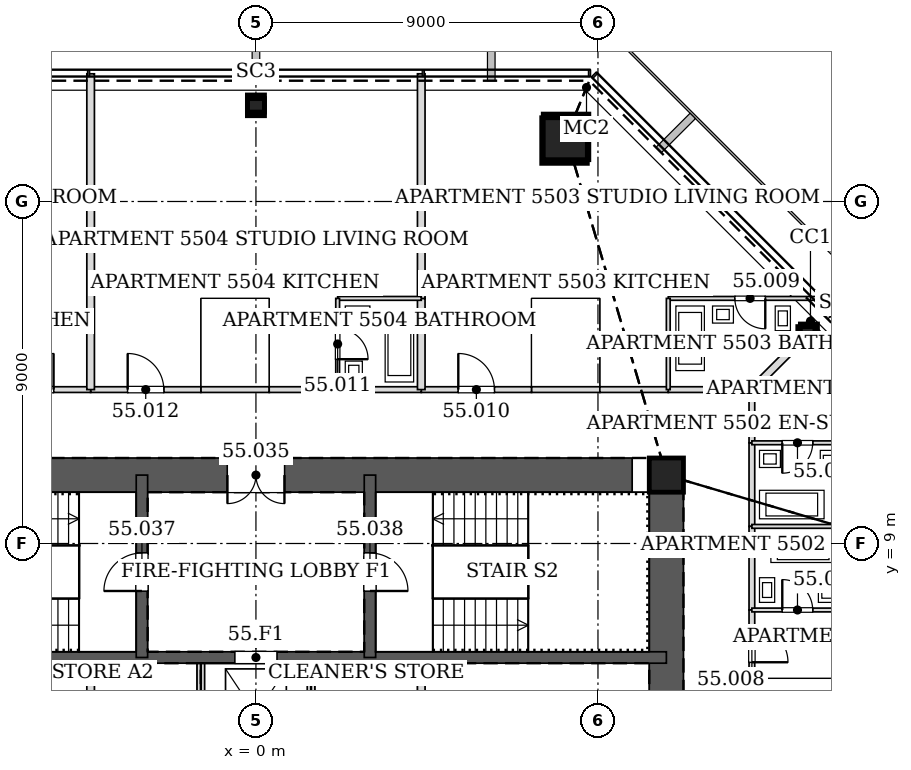
"""IFC4 building model, lengths in metres.
Left out: names, types, materials, properties, quantities, classifications, styles, units other than length and angle.
Written with IfcOpenShell. Run it as: python <this file> out.ifc"""

import sys

from ifc_helpers import new_model, si_unit, direction, frame, frame_2d, origin, origin_2d, place, context, subcontext, project, spatial, rectangle, hollow_rectangle, extrude, element, fill, save


model = new_model("IFC4")
c1 = context("Model", 3, precision=1e-05, world=origin(), true_north=direction((0.0, 1.0)))
c2 = subcontext(c1, "Body", "Model", "MODEL_VIEW")
j1 = project(units=[si_unit("LENGTHUNIT", "METRE"), si_unit("PLANEANGLEUNIT", "RADIAN")], contexts=[c1])
p1 = place(None, origin())
s1 = spatial("IfcSite", under=j1, at=p1, CompositionType="ELEMENT")
p2 = place(p1, origin())
s2 = spatial("IfcBuilding", under=s1, at=p2, CompositionType="ELEMENT")
p3 = place(p2, frame((0.0, 0.0, 234.6)))
s3 = spatial("IfcBuildingStorey", under=s2, at=p3, CompositionType="ELEMENT", Elevation=234.6)
p4 = place(p3, frame((8.16, 19.7, 0.0), z_axis=(-0.01169924247, -0.02827915051, 0.999531598986), x_axis=(0.924045401938, -0.382282742426, 0.0)))
e1 = element("IfcColumn", 1, at=p4, inside=s3, PredefinedType="COLUMN", context=c2, shape_type="SweptSolid", body=[
    extrude(hollow_rectangle(XDim=1.2, YDim=1.2, WallThickness=0.055, at=origin_2d()), origin(), (0.0, 0.0, 1.0), 3.402),
])
for number, where, z_axis, x_axis in (
    (2, (14.551, 14.551, 0.0), (-0.02, -0.02, 1.0), (0.707, -0.707, 0.0)),
    (3, (0.0, 20.578, 0.0), (0.0, -0.028, 1.0), (1.0, 0.0, 0.0)),
):
    element("IfcColumn", number, at=place(p3, frame(where, z_axis=z_axis, x_axis=x_axis)), inside=s3, PredefinedType="COLUMN", context=c2, shape_type="SweptSolid", body=[
        extrude(hollow_rectangle(XDim=0.45, YDim=0.45, WallThickness=0.02, at=origin_2d()), origin(), (0.0, 0.0, 1.0), 3.401),
    ])
p5 = place(p3, frame((10.8, 10.8, 0.0), z_axis=(0.0, 0.0, 1.0), x_axis=(1.0, 0.0, 0.0)))
e4 = element("IfcColumn", 4, at=p5, inside=s3, PredefinedType="COLUMN", context=c2, shape_type="SweptSolid", body=[
    extrude(hollow_rectangle(XDim=0.9, YDim=0.9, WallThickness=0.04, at=origin_2d()), origin(), (0.0, 0.0, 1.0), 3.4),
])
p6 = place(p3, frame((10.8, -10.8, 0.0), z_axis=(0.0, 0.0, 1.0), x_axis=(0.0, 1.0, 0.0)))
e5 = element("IfcWall", 5, at=p6, inside=s3, PredefinedType="SOLIDWALL", context=c2, shape_type="SweptSolid", body=[
    extrude(rectangle(XDim=21.6, YDim=0.9, at=frame_2d((10.8, 0.0))), origin(), (0.0, 0.0, 1.0), 3.4),
])
p7 = place(p6, frame((11.7, 0.0, 0.0)))
e6 = element("IfcOpeningElement", 6, at=p7, cuts=e5, PredefinedType="OPENING", context=c2, shape_type="SweptSolid", body=[
    extrude(rectangle(XDim=1.2, YDim=2.1, at=frame_2d((0.6, 1.05))), frame((0.0, 0.46, 0.0), z_axis=(0.0, -1.0, 0.0), x_axis=(1.0, 0.0, 0.0)), (0.0, 0.0, 1.0), 0.92),
])
p8 = place(p6, frame((8.7, 0.0, 0.0)))
e7 = element("IfcOpeningElement", 7, at=p8, cuts=e5, PredefinedType="OPENING", context=c2, shape_type="SweptSolid", body=[
    extrude(rectangle(XDim=1.2, YDim=2.1, at=frame_2d((0.6, 1.05))), frame((0.0, 0.46, 0.0), z_axis=(0.0, -1.0, 0.0), x_axis=(1.0, 0.0, 0.0)), (0.0, 0.0, 1.0), 0.92),
])
p9 = place(p3, frame((10.8, 10.8, 0.0), z_axis=(0.0, 0.0, 1.0), x_axis=(-1.0, 0.0, 0.0)))
e8 = element("IfcWall", 8, at=p9, inside=s3, PredefinedType="SOLIDWALL", context=c2, shape_type="SweptSolid", body=[
    extrude(rectangle(XDim=21.6, YDim=0.9, at=frame_2d((10.8, 0.0))), origin(), (0.0, 0.0, 1.0), 3.4),
])
p10 = place(p9, frame((10.05, 0.0, 0.0)))
e9 = element("IfcOpeningElement", 9, at=p10, cuts=e8, PredefinedType="OPENING", context=c2, shape_type="SweptSolid", body=[
    extrude(rectangle(XDim=1.5, YDim=2.1, at=frame_2d((0.75, 1.05))), frame((0.0, 0.46, 0.0), z_axis=(0.0, -1.0, 0.0), x_axis=(1.0, 0.0, 0.0)), (0.0, 0.0, 1.0), 0.92),
])
p11 = place(p3, frame((-10.8, 6.0, 0.0), z_axis=(0.0, 0.0, 1.0), x_axis=(1.0, 0.0, 0.0)))
e10 = element("IfcWall", 10, at=p11, inside=s3, PredefinedType="SOLIDWALL", context=c2, shape_type="SweptSolid", body=[
    extrude(rectangle(XDim=21.6, YDim=0.3, at=frame_2d((10.8, 0.0))), origin(), (0.0, 0.0, 1.0), 3.4),
])
p12 = place(p11, frame((10.25, 0.0, 0.0)))
e11 = element("IfcOpeningElement", 11, at=p12, cuts=e10, PredefinedType="OPENING", context=c2, shape_type="SweptSolid", body=[
    extrude(rectangle(XDim=1.1, YDim=2.1, at=frame_2d((0.55, 1.05))), frame((0.0, 0.16, 0.0), z_axis=(0.0, -1.0, 0.0), x_axis=(1.0, 0.0, 0.0)), (0.0, 0.0, 1.0), 0.32),
])
p13 = place(p3, frame((-3.0, 6.0, 0.0), z_axis=(0.0, 0.0, 1.0), x_axis=(0.0, 1.0, 0.0)))
e12 = element("IfcWall", 12, at=p13, inside=s3, PredefinedType="SOLIDWALL", context=c2, shape_type="SweptSolid", body=[
    extrude(rectangle(XDim=4.8, YDim=0.3, at=frame_2d((2.4, 0.0))), origin(), (0.0, 0.0, 1.0), 3.4),
])
p14 = place(p13, frame((1.75, 0.0, 0.0)))
e13 = element("IfcOpeningElement", 13, at=p14, cuts=e12, PredefinedType="OPENING", context=c2, shape_type="SweptSolid", body=[
    extrude(rectangle(XDim=1.0, YDim=2.1, at=frame_2d((0.5, 1.05))), frame((0.0, 0.16, 0.0), z_axis=(0.0, -1.0, 0.0), x_axis=(1.0, 0.0, 0.0)), (0.0, 0.0, 1.0), 0.32),
])
p15 = place(p3, frame((3.0, 6.0, 0.0), z_axis=(0.0, 0.0, 1.0), x_axis=(0.0, 1.0, 0.0)))
e14 = element("IfcWall", 14, at=p15, inside=s3, PredefinedType="SOLIDWALL", context=c2, shape_type="SweptSolid", body=[
    extrude(rectangle(XDim=4.8, YDim=0.3, at=frame_2d((2.4, 0.0))), origin(), (0.0, 0.0, 1.0), 3.4),
])
p16 = place(p15, frame((1.75, 0.0, 0.0)))
e15 = element("IfcOpeningElement", 15, at=p16, cuts=e14, PredefinedType="OPENING", context=c2, shape_type="SweptSolid", body=[
    extrude(rectangle(XDim=1.0, YDim=2.1, at=frame_2d((0.5, 1.05))), frame((0.0, 0.16, 0.0), z_axis=(0.0, -1.0, 0.0), x_axis=(1.0, 0.0, 0.0)), (0.0, 0.0, 1.0), 0.32),
])
p17 = place(p3, frame((13.05, 9.449, 0.0), z_axis=(0.0, 0.0, 1.0), x_axis=(0.0, 1.0, 0.0)))
e16 = element("IfcWall", 16, at=p17, inside=s3, PredefinedType="PARTITIONING", context=c2, shape_type="SweptSolid", body=[
    extrude(rectangle(XDim=2.202, YDim=0.15, at=frame_2d((1.101, 0.0))), origin(), (0.0, 0.0, 1.0), 2.344),
])
p18 = place(p3, frame((13.05, 11.649, 0.0), z_axis=(0.0, 0.0, 1.0), x_axis=(0.0, 1.0, 0.0)))
e17 = element("IfcWall", 17, at=p18, inside=s3, PredefinedType="PARTITIONING", context=c2, shape_type="SweptSolid", body=[
    extrude(rectangle(XDim=1.401, YDim=0.15, at=frame_2d((0.701, 0.0))), origin(), (0.0, 0.0, 1.0), 2.583),
])
p19 = place(p3, frame((13.05, 7.249, 0.0), z_axis=(0.0, 0.0, 1.0), x_axis=(0.0, 1.0, 0.0)))
e18 = element("IfcWall", 18, at=p19, inside=s3, PredefinedType="PARTITIONING", context=c2, shape_type="SweptSolid", body=[
    extrude(rectangle(XDim=2.202, YDim=0.15, at=frame_2d((1.101, 0.0))), origin(), (0.0, 0.0, 1.0), 2.73),
])
p20 = place(p3, frame((13.05, 3.649, 0.0), z_axis=(0.0, 0.0, 1.0), x_axis=(0.0, 1.0, 0.0)))
e19 = element("IfcWall", 19, at=p20, inside=s3, PredefinedType="PARTITIONING", context=c2, shape_type="SweptSolid", body=[
    extrude(rectangle(XDim=1.802, YDim=0.15, at=frame_2d((0.901, 0.0))), origin(), (0.0, 0.0, 1.0), 2.73),
])
p21 = place(p3, frame((13.05, 5.449, 0.0), z_axis=(0.0, 0.0, 1.0), x_axis=(0.0, 1.0, 0.0)))
e20 = element("IfcWall", 20, at=p21, inside=s3, PredefinedType="PARTITIONING", context=c2, shape_type="SweptSolid", body=[
    extrude(rectangle(XDim=1.802, YDim=0.15, at=frame_2d((0.901, 0.0))), origin(), (0.0, 0.0, 1.0), 2.73),
])
p22 = place(p21, frame((0.426, 0.0, 0.0)))
e21 = element("IfcOpeningElement", 21, at=p22, cuts=e20, PredefinedType="OPENING", context=c2, shape_type="SweptSolid", body=[
    extrude(rectangle(XDim=0.95, YDim=2.1, at=frame_2d((0.475, 1.05))), frame((0.0, 0.085, 0.0), z_axis=(0.0, -1.0, 0.0), x_axis=(1.0, 0.0, 0.0)), (0.0, 0.0, 1.0), 0.17),
])
p23 = place(p3, frame((13.05, 13.05, 0.0), z_axis=(0.0, 0.0, 1.0), x_axis=(-1.0, 0.0, 0.0)))
e22 = element("IfcWall", 22, at=p23, inside=s3, PredefinedType="PARTITIONING", context=c2, shape_type="SweptSolid", body=[
    extrude(rectangle(XDim=2.201, YDim=0.15, at=frame_2d((1.101, 0.0))), origin(), (0.0, 0.0, 1.0), 2.583),
])
p24 = place(p3, frame((9.051, 13.05, 0.0), z_axis=(0.0, 0.0, 1.0), x_axis=(-1.0, 0.0, 0.0)))
e23 = element("IfcWall", 23, at=p24, inside=s3, PredefinedType="PARTITIONING", context=c2, shape_type="SweptSolid", body=[
    extrude(rectangle(XDim=1.802, YDim=0.15, at=frame_2d((0.901, 0.0))), origin(), (0.0, 0.0, 1.0), 2.73),
])
p25 = place(p3, frame((7.251, 13.05, 0.0), z_axis=(0.0, 0.0, 1.0), x_axis=(-1.0, 0.0, 0.0)))
e24 = element("IfcWall", 24, at=p25, inside=s3, PredefinedType="PARTITIONING", context=c2, shape_type="SweptSolid", body=[
    extrude(rectangle(XDim=2.902, YDim=0.15, at=frame_2d((1.451, 0.0))), origin(), (0.0, 0.0, 1.0), 2.73),
])
p26 = place(p25, frame((0.976, 0.0, 0.0)))
e25 = element("IfcOpeningElement", 25, at=p26, cuts=e24, PredefinedType="OPENING", context=c2, shape_type="SweptSolid", body=[
    extrude(rectangle(XDim=0.95, YDim=2.1, at=frame_2d((0.475, 1.05))), frame((0.0, 0.085, 0.0), z_axis=(0.0, -1.0, 0.0), x_axis=(1.0, 0.0, 0.0)), (0.0, 0.0, 1.0), 0.17),
])
p27 = place(p3, frame((10.851, 13.05, 0.0), z_axis=(0.0, 0.0, 1.0), x_axis=(-1.0, 0.0, 0.0)))
e26 = element("IfcWall", 26, at=p27, inside=s3, PredefinedType="PARTITIONING", context=c2, shape_type="SweptSolid", body=[
    extrude(rectangle(XDim=1.802, YDim=0.15, at=frame_2d((0.901, 0.0))), origin(), (0.0, 0.0, 1.0), 2.344),
])
p28 = place(p3, frame((4.351, 13.05, 0.0), z_axis=(0.0, 0.0, 1.0), x_axis=(-1.0, 0.0, 0.0)))
e27 = element("IfcWall", 27, at=p28, inside=s3, PredefinedType="PARTITIONING", context=c2, shape_type="SweptSolid", body=[
    extrude(rectangle(XDim=2.202, YDim=0.15, at=frame_2d((1.101, 0.0))), origin(), (0.0, 0.0, 1.0), 2.73),
])
p29 = place(p3, frame((0.351, 13.05, 0.0), z_axis=(0.0, 0.0, 1.0), x_axis=(-1.0, 0.0, 0.0)))
e28 = element("IfcWall", 28, at=p29, inside=s3, PredefinedType="PARTITIONING", context=c2, shape_type="SweptSolid", body=[
    extrude(rectangle(XDim=1.802, YDim=0.15, at=frame_2d((0.901, 0.0))), origin(), (0.0, 0.0, 1.0), 2.331),
])
p30 = place(p3, frame((-1.449, 13.05, 0.0), z_axis=(0.0, 0.0, 1.0), x_axis=(-1.0, 0.0, 0.0)))
e29 = element("IfcWall", 29, at=p30, inside=s3, PredefinedType="PARTITIONING", context=c2, shape_type="SweptSolid", body=[
    extrude(rectangle(XDim=2.902, YDim=0.15, at=frame_2d((1.451, 0.0))), origin(), (0.0, 0.0, 1.0), 2.73),
])
p31 = place(p30, frame((0.976, 0.0, 0.0)))
e30 = element("IfcOpeningElement", 30, at=p31, cuts=e29, PredefinedType="OPENING", context=c2, shape_type="SweptSolid", body=[
    extrude(rectangle(XDim=0.95, YDim=2.1, at=frame_2d((0.475, 1.05))), frame((0.0, 0.085, 0.0), z_axis=(0.0, -1.0, 0.0), x_axis=(1.0, 0.0, 0.0)), (0.0, 0.0, 1.0), 0.17),
])
p32 = place(p3, frame((2.151, 13.05, 0.0), z_axis=(0.0, 0.0, 1.0), x_axis=(-1.0, 0.0, 0.0)))
e31 = element("IfcWall", 31, at=p32, inside=s3, PredefinedType="PARTITIONING", context=c2, shape_type="SweptSolid", body=[
    extrude(rectangle(XDim=1.802, YDim=0.15, at=frame_2d((0.901, 0.0))), origin(), (0.0, 0.0, 1.0), 2.73),
])
p33 = place(p3, frame((-4.349, 13.05, 0.0), z_axis=(0.0, 0.0, 1.0), x_axis=(-1.0, 0.0, 0.0)))
e32 = element("IfcWall", 32, at=p33, inside=s3, PredefinedType="PARTITIONING", context=c2, shape_type="SweptSolid", body=[
    extrude(rectangle(XDim=2.902, YDim=0.15, at=frame_2d((1.451, 0.0))), origin(), (0.0, 0.0, 1.0), 2.73),
])
p34 = place(p33, frame((0.976, 0.0, 0.0)))
e33 = element("IfcOpeningElement", 33, at=p34, cuts=e32, PredefinedType="OPENING", context=c2, shape_type="SweptSolid", body=[
    extrude(rectangle(XDim=0.95, YDim=2.1, at=frame_2d((0.475, 1.05))), frame((0.0, 0.085, 0.0), z_axis=(0.0, -1.0, 0.0), x_axis=(1.0, 0.0, 0.0)), (0.0, 0.0, 1.0), 0.17),
])
p35 = place(p3, frame((15.45, 11.65, 0.0), z_axis=(0.0, 0.0, 1.0), x_axis=(-1.0, 0.0, 0.0)))
e34 = element("IfcWall", 34, at=p35, inside=s3, PredefinedType="PARTITIONING", context=c2, shape_type="SweptSolid", body=[
    extrude(rectangle(XDim=2.4, YDim=0.1, at=frame_2d((1.2, 0.0))), origin(), (0.0, 0.0, 1.0), 2.786),
])
p36 = place(p35, frame((0.8, 0.0, 0.0)))
e35 = element("IfcOpeningElement", 35, at=p36, cuts=e34, PredefinedType="OPENING", context=c2, shape_type="SweptSolid", body=[
    extrude(rectangle(XDim=0.8, YDim=2.1, at=frame_2d((0.4, 1.05))), frame((0.0, 0.06, 0.0), z_axis=(0.0, -1.0, 0.0), x_axis=(1.0, 0.0, 0.0)), (0.0, 0.0, 1.0), 0.12),
])
p37 = place(p3, frame((13.05, 9.45, 0.0), z_axis=(0.0, 0.0, 1.0), x_axis=(1.0, 0.0, 0.0)))
e36 = element("IfcWall", 36, at=p37, inside=s3, PredefinedType="PARTITIONING", context=c2, shape_type="SweptSolid", body=[
    extrude(rectangle(XDim=2.4, YDim=0.1, at=frame_2d((1.2, 0.0))), origin(), (0.0, 0.0, 1.0), 2.344),
])
p38 = place(p3, frame((14.31, 14.31, 0.0), z_axis=(0.0, 0.0, 1.0), x_axis=(-0.707106781187, -0.707106781187, 0.0)))
e37 = element("IfcWall", 37, at=p38, inside=s3, PredefinedType="PARTITIONING", context=c2, shape_type="SweptSolid", body=[
    extrude(rectangle(XDim=1.782, YDim=0.2, at=frame_2d((0.891, 0.0))), origin(), (0.0, 0.0, 1.0), 2.583),
])
p39 = place(p3, frame((13.05, 7.25, 0.0), z_axis=(0.0, 0.0, 1.0), x_axis=(1.0, 0.0, 0.0)))
e38 = element("IfcWall", 38, at=p39, inside=s3, PredefinedType="PARTITIONING", context=c2, shape_type="SweptSolid", body=[
    extrude(rectangle(XDim=2.4, YDim=0.1, at=frame_2d((1.2, 0.0))), origin(), (0.0, 0.0, 1.0), 2.73),
])
p40 = place(p39, frame((0.8, 0.0, 0.0)))
e39 = element("IfcOpeningElement", 39, at=p40, cuts=e38, PredefinedType="OPENING", context=c2, shape_type="SweptSolid", body=[
    extrude(rectangle(XDim=0.8, YDim=2.1, at=frame_2d((0.4, 1.05))), frame((0.0, 0.06, 0.0), z_axis=(0.0, -1.0, 0.0), x_axis=(1.0, 0.0, 0.0)), (0.0, 0.0, 1.0), 0.12),
])
p41 = place(p3, frame((14.762, 15.45, 0.0), z_axis=(0.0, 0.0, 1.0), x_axis=(-1.0, 0.0, 0.0)))
e40 = element("IfcWall", 40, at=p41, inside=s3, PredefinedType="PARTITIONING", context=c2, shape_type="SweptSolid", body=[
    extrude(rectangle(XDim=3.912, YDim=0.1, at=frame_2d((1.956, 0.0))), origin(), (0.0, 0.0, 1.0), 2.783),
])
p42 = place(p41, frame((1.359, 0.0, 0.0)))
e41 = element("IfcOpeningElement", 41, at=p42, cuts=e40, PredefinedType="OPENING", context=c2, shape_type="SweptSolid", body=[
    extrude(rectangle(XDim=0.8, YDim=2.1, at=frame_2d((0.4, 1.05))), frame((0.0, 0.06, 0.0), z_axis=(0.0, -1.0, 0.0), x_axis=(1.0, 0.0, 0.0)), (0.0, 0.0, 1.0), 0.12),
])
p43 = place(p3, frame((10.85, 15.45, 0.0), z_axis=(0.0, 0.0, 1.0), x_axis=(0.0, -1.0, 0.0)))
e42 = element("IfcWall", 42, at=p43, inside=s3, PredefinedType="PARTITIONING", context=c2, shape_type="SweptSolid", body=[
    extrude(rectangle(XDim=2.4, YDim=0.1, at=frame_2d((1.2, 0.0))), origin(), (0.0, 0.0, 1.0), 2.786),
])
p44 = place(p3, frame((4.35, 15.451, 0.0), z_axis=(0.0, 0.0, 1.0), x_axis=(0.0, -1.0, 0.0)))
e43 = element("IfcWall", 43, at=p44, inside=s3, PredefinedType="PARTITIONING", context=c2, shape_type="SweptSolid", body=[
    extrude(rectangle(XDim=2.401, YDim=0.2, at=frame_2d((1.2, 0.0))), origin(), (0.0, 0.0, 1.0), 2.73),
])
p45 = place(p3, frame((4.35, 21.36, 0.0), z_axis=(0.0, 0.0, 1.0), x_axis=(0.0, -1.0, 0.0)))
e44 = element("IfcWall", 44, at=p45, inside=s3, PredefinedType="PARTITIONING", context=c2, shape_type="SweptSolid", body=[
    extrude(rectangle(XDim=5.911, YDim=0.2, at=frame_2d((2.956, 0.0))), origin(), (0.0, 0.0, 1.0), 2.662),
])
p46 = place(p3, frame((4.35, 15.45, 0.0), z_axis=(0.0, 0.0, 1.0), x_axis=(-1.0, 0.0, 0.0)))
e45 = element("IfcWall", 45, at=p46, inside=s3, PredefinedType="PARTITIONING", context=c2, shape_type="SweptSolid", body=[
    extrude(rectangle(XDim=2.2, YDim=0.1, at=frame_2d((1.1, 0.0))), origin(), (0.0, 0.0, 1.0), 3.2),
])
p47 = place(p3, frame((2.15, 15.45, 0.0), z_axis=(0.0, 0.0, 1.0), x_axis=(0.0, -1.0, 0.0)))
e46 = element("IfcWall", 46, at=p47, inside=s3, PredefinedType="PARTITIONING", context=c2, shape_type="SweptSolid", body=[
    extrude(rectangle(XDim=2.4, YDim=0.1, at=frame_2d((1.2, 0.0))), origin(), (0.0, 0.0, 1.0), 2.73),
])
p48 = place(p47, frame((0.8, 0.0, 0.0)))
e47 = element("IfcOpeningElement", 47, at=p48, cuts=e46, PredefinedType="OPENING", context=c2, shape_type="SweptSolid", body=[
    extrude(rectangle(XDim=0.8, YDim=2.1, at=frame_2d((0.4, 1.05))), frame((0.0, 0.06, 0.0), z_axis=(0.0, -1.0, 0.0), x_axis=(1.0, 0.0, 0.0)), (0.0, 0.0, 1.0), 0.12),
])
p49 = place(p3, frame((-4.35, 21.36, 0.0), z_axis=(0.0, 0.0, 1.0), x_axis=(0.0, -1.0, 0.0)))
e48 = element("IfcWall", 48, at=p49, inside=s3, PredefinedType="PARTITIONING", context=c2, shape_type="SweptSolid", body=[
    extrude(rectangle(XDim=8.31, YDim=0.2, at=frame_2d((4.155, 0.0))), origin(), (0.0, 0.0, 1.0), 2.662),
])
for number, where, z_axis, x_axis in (
    (49, (-4.35, 3.15, 0.0), (0.0, 0.0, 1.0), (0.0, 1.0, 0.0)),
    (50, (-1.45, 3.15, 0.0), (0.0, 0.0, 1.0), (0.0, 1.0, 0.0)),
    (51, (1.45, 3.15, 0.0), (0.0, 0.0, 1.0), (0.0, 1.0, 0.0)),
    (52, (4.35, 3.15, 0.0), (0.0, 0.0, 1.0), (0.0, 1.0, 0.0)),
):
    element("IfcWall", number, at=place(p3, frame(where, z_axis=z_axis, x_axis=x_axis)), inside=s3, PredefinedType="PARTITIONING", context=c2, shape_type="SweptSolid", body=[
        extrude(rectangle(XDim=2.7, YDim=0.2, at=frame_2d((1.35, 0.0))), origin(), (0.0, 0.0, 1.0), 3.2),
    ])
p50 = place(p36, origin())
e53 = element("IfcDoor", 53, at=p50, inside=s3, OperationType="SINGLE_SWING_RIGHT", PredefinedType="DOOR", context=c2, shape_type="SweptSolid", body=[
    extrude(rectangle(XDim=0.8, YDim=2.1, at=frame_2d((0.4, 1.05))), frame((0.0, 0.025, 0.0), z_axis=(0.0, -1.0, 0.0), x_axis=(1.0, 0.0, 0.0)), (0.0, 0.0, 1.0), 0.05),
])
fill(e35, e53)
p51 = place(p40, origin())
e54 = element("IfcDoor", 54, at=p51, inside=s3, OperationType="SINGLE_SWING_LEFT", PredefinedType="DOOR", context=c2, shape_type="SweptSolid", body=[
    extrude(rectangle(XDim=0.8, YDim=2.1, at=frame_2d((0.4, 1.05))), frame((0.0, 0.025, 0.0), z_axis=(0.0, -1.0, 0.0), x_axis=(1.0, 0.0, 0.0)), (0.0, 0.0, 1.0), 0.05),
])
fill(e39, e54)
p52 = place(p22, frame((0.95, 0.0, 0.0), z_axis=(0.0, 0.0, 1.0), x_axis=(-1.0, 0.0, 0.0)))
e55 = element("IfcDoor", 55, at=p52, inside=s3, OperationType="SINGLE_SWING_RIGHT", PredefinedType="DOOR", context=c2, shape_type="SweptSolid", body=[
    extrude(rectangle(XDim=0.95, YDim=2.1, at=frame_2d((0.475, 1.05))), frame((0.0, 0.025, 0.0), z_axis=(0.0, -1.0, 0.0), x_axis=(1.0, 0.0, 0.0)), (0.0, 0.0, 1.0), 0.05),
])
fill(e21, e55)
p53 = place(p42, origin())
e56 = element("IfcDoor", 56, at=p53, inside=s3, OperationType="SINGLE_SWING_LEFT", PredefinedType="DOOR", context=c2, shape_type="SweptSolid", body=[
    extrude(rectangle(XDim=0.8, YDim=2.1, at=frame_2d((0.4, 1.05))), frame((0.0, 0.025, 0.0), z_axis=(0.0, -1.0, 0.0), x_axis=(1.0, 0.0, 0.0)), (0.0, 0.0, 1.0), 0.05),
])
fill(e41, e56)
p54 = place(p26, frame((0.95, 0.0, 0.0), z_axis=(0.0, 0.0, 1.0), x_axis=(-1.0, 0.0, 0.0)))
e57 = element("IfcDoor", 57, at=p54, inside=s3, OperationType="SINGLE_SWING_LEFT", PredefinedType="DOOR", context=c2, shape_type="SweptSolid", body=[
    extrude(rectangle(XDim=0.95, YDim=2.1, at=frame_2d((0.475, 1.05))), frame((0.0, 0.025, 0.0), z_axis=(0.0, -1.0, 0.0), x_axis=(1.0, 0.0, 0.0)), (0.0, 0.0, 1.0), 0.05),
])
fill(e25, e57)
p55 = place(p48, origin())
e58 = element("IfcDoor", 58, at=p55, inside=s3, OperationType="SINGLE_SWING_RIGHT", PredefinedType="DOOR", context=c2, shape_type="SweptSolid", body=[
    extrude(rectangle(XDim=0.8, YDim=2.1, at=frame_2d((0.4, 1.05))), frame((0.0, 0.025, 0.0), z_axis=(0.0, -1.0, 0.0), x_axis=(1.0, 0.0, 0.0)), (0.0, 0.0, 1.0), 0.05),
])
fill(e47, e58)
p56 = place(p31, frame((0.95, 0.0, 0.0), z_axis=(0.0, 0.0, 1.0), x_axis=(-1.0, 0.0, 0.0)))
e59 = element("IfcDoor", 59, at=p56, inside=s3, OperationType="SINGLE_SWING_LEFT", PredefinedType="DOOR", context=c2, shape_type="SweptSolid", body=[
    extrude(rectangle(XDim=0.95, YDim=2.1, at=frame_2d((0.475, 1.05))), frame((0.0, 0.025, 0.0), z_axis=(0.0, -1.0, 0.0), x_axis=(1.0, 0.0, 0.0)), (0.0, 0.0, 1.0), 0.05),
])
fill(e30, e59)
p57 = place(p34, frame((0.95, 0.0, 0.0), z_axis=(0.0, 0.0, 1.0), x_axis=(-1.0, 0.0, 0.0)))
e60 = element("IfcDoor", 60, at=p57, inside=s3, OperationType="SINGLE_SWING_RIGHT", PredefinedType="DOOR", context=c2, shape_type="SweptSolid", body=[
    extrude(rectangle(XDim=0.95, YDim=2.1, at=frame_2d((0.475, 1.05))), frame((0.0, 0.025, 0.0), z_axis=(0.0, -1.0, 0.0), x_axis=(1.0, 0.0, 0.0)), (0.0, 0.0, 1.0), 0.05),
])
fill(e33, e60)
p58 = place(p10, origin())
e61 = element("IfcDoor", 61, at=p58, inside=s3, OperationType="DOUBLE_DOOR_SINGLE_SWING", PredefinedType="DOOR", context=c2, shape_type="SweptSolid", body=[
    extrude(rectangle(XDim=1.5, YDim=2.1, at=frame_2d((0.75, 1.05))), frame((0.0, 0.025, 0.0), z_axis=(0.0, -1.0, 0.0), x_axis=(1.0, 0.0, 0.0)), (0.0, 0.0, 1.0), 0.05),
])
fill(e9, e61)
p59 = place(p14, origin())
e62 = element("IfcDoor", 62, at=p59, inside=s3, OperationType="SINGLE_SWING_LEFT", PredefinedType="DOOR", context=c2, shape_type="SweptSolid", body=[
    extrude(rectangle(XDim=1.0, YDim=2.1, at=frame_2d((0.5, 1.05))), frame((0.0, 0.025, 0.0), z_axis=(0.0, -1.0, 0.0), x_axis=(1.0, 0.0, 0.0)), (0.0, 0.0, 1.0), 0.05),
])
fill(e13, e62)
p60 = place(p16, frame((1.0, 0.0, 0.0), z_axis=(0.0, 0.0, 1.0), x_axis=(-1.0, 0.0, 0.0)))
e63 = element("IfcDoor", 63, at=p60, inside=s3, OperationType="SINGLE_SWING_RIGHT", PredefinedType="DOOR", context=c2, shape_type="SweptSolid", body=[
    extrude(rectangle(XDim=1.0, YDim=2.1, at=frame_2d((0.5, 1.05))), frame((0.0, 0.025, 0.0), z_axis=(0.0, -1.0, 0.0), x_axis=(1.0, 0.0, 0.0)), (0.0, 0.0, 1.0), 0.05),
])
fill(e15, e63)
p61 = place(p12, origin())
e64 = element("IfcDoor", 64, at=p61, inside=s3, OperationType="DOUBLE_DOOR_SLIDING", PredefinedType="DOOR", context=c2, shape_type="SweptSolid", body=[
    extrude(rectangle(XDim=1.1, YDim=2.1, at=frame_2d((0.55, 1.05))), frame((0.0, 0.025, 0.0), z_axis=(0.0, -1.0, 0.0), x_axis=(1.0, 0.0, 0.0)), (0.0, 0.0, 1.0), 0.05),
])
fill(e11, e64)
save(model, sys.argv[1])
